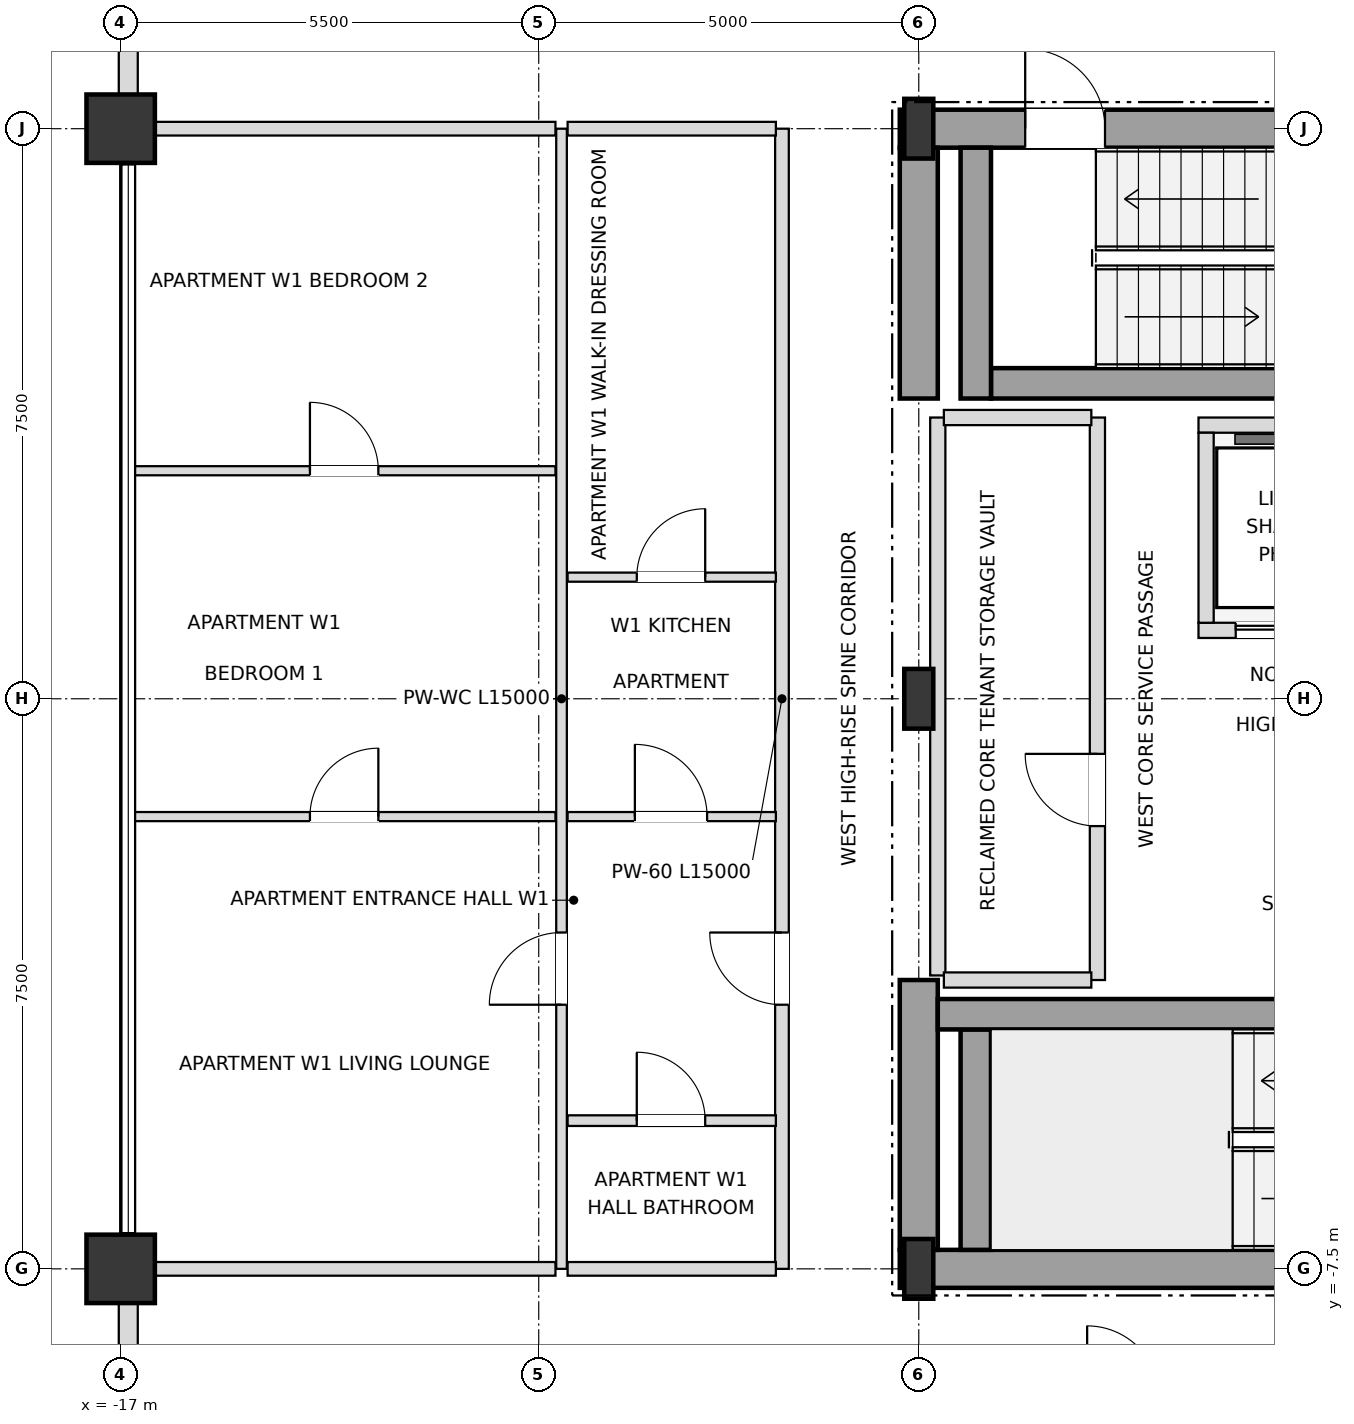
"""IFC4 building model, lengths in metres.
Left out: names, types, materials, properties, quantities, classifications, styles, units other than length and angle.
Written with IfcOpenShell. Run it as: python <this file> out.ifc"""

import sys

from ifc_helpers import new_model, si_unit, direction, frame, frame_2d, origin, origin_2d, place, context, subcontext, project, spatial, rectangle, i_section, extrude, element, fill, save


model = new_model("IFC4")
c1 = context("Model", 3, precision=1e-05, world=origin(), true_north=direction((0.0, 1.0)))
c2 = subcontext(c1, "Body", "Model", "MODEL_VIEW")
j1 = project(units=[si_unit("LENGTHUNIT", "METRE"), si_unit("PLANEANGLEUNIT", "RADIAN")], contexts=[c1])
p1 = place(None, origin())
s1 = spatial("IfcSite", under=j1, at=p1, CompositionType="ELEMENT")
p2 = place(p1, origin())
s2 = spatial("IfcBuilding", under=s1, at=p2, CompositionType="ELEMENT")
p3 = place(p2, frame((0.0, 0.0, 254.7)))
s3 = spatial("IfcBuildingStorey", under=s2, at=p3, CompositionType="ELEMENT", Elevation=254.7)
for number, where, z_axis, x_axis in (
    (1, (-6.5, -7.5, 0.0), (0.0, 0.0, 1.0), (1.0, 0.0, 0.0)),
    (2, (-6.5, 0.0, 0.0), (0.0, 0.0, 1.0), (1.0, 0.0, 0.0)),
    (3, (-6.5, 7.5, 0.0), (0.0, 0.0, 1.0), (1.0, 0.0, 0.0)),
):
    element("IfcColumn", number, at=place(p3, frame(where, z_axis=z_axis, x_axis=x_axis)), inside=s3, PredefinedType="COLUMN", context=c2, shape_type="SweptSolid", body=[
        extrude(i_section(OverallWidth=0.382, OverallDepth=0.786, WebThickness=0.02, FlangeThickness=0.033, at=origin_2d()), origin(), (0.0, 0.0, 1.0), 3.6),
    ])
for number, where, z_axis, x_axis in (
    (4, (-17.0, 7.5, 0.0), (0.0, 0.0, 1.0), (1.0, 0.0, 0.0)),
    (5, (-17.0, -7.5, 0.0), (0.0, 0.0, 1.0), (1.0, 0.0, 0.0)),
):
    element("IfcColumn", number, at=place(p3, frame(where, z_axis=z_axis, x_axis=x_axis)), inside=s3, PredefinedType="USERDEFINED", context=c2, shape_type="SweptSolid", body=[
        extrude(rectangle(XDim=0.9, YDim=0.9, at=origin_2d()), origin(), (0.0, 0.0, 1.0), 3.6),
    ])
p4 = place(p3, frame((-16.9, 12.555, 0.0), z_axis=(0.0, 0.0, 1.0), x_axis=(0.0, -1.0, 0.0)))
e6 = element("IfcWall", 6, at=p4, inside=s3, PredefinedType="SOLIDWALL", context=c2, shape_type="SweptSolid", body=[
    extrude(rectangle(XDim=4.61, YDim=0.25, at=frame_2d((2.305, 0.0))), origin(), (0.0, 0.0, 1.0), 2.748),
])
p5 = place(p4, frame((1.405, 0.0, 0.72)))
e7 = element("IfcOpeningElement", 7, at=p5, cuts=e6, PredefinedType="OPENING", context=c2, shape_type="SweptSolid", body=[
    extrude(rectangle(XDim=1.8, YDim=1.68, at=frame_2d((0.9, 0.84))), frame((0.0, 0.135, 0.0), z_axis=(0.0, -1.0, 0.0), x_axis=(1.0, 0.0, 0.0)), (0.0, 0.0, 1.0), 0.27),
])
p6 = place(p3, frame((-16.9, -7.945, 0.0), z_axis=(0.0, 0.0, 1.0), x_axis=(0.0, -1.0, 0.0)))
e8 = element("IfcWall", 8, at=p6, inside=s3, PredefinedType="SOLIDWALL", context=c2, shape_type="SweptSolid", body=[
    extrude(rectangle(XDim=4.61, YDim=0.25, at=frame_2d((2.305, 0.0))), origin(), (0.0, 0.0, 1.0), 2.748),
])
p7 = place(p6, frame((1.405, 0.0, 0.72)))
e9 = element("IfcOpeningElement", 9, at=p7, cuts=e8, PredefinedType="OPENING", context=c2, shape_type="SweptSolid", body=[
    extrude(rectangle(XDim=1.8, YDim=1.68, at=frame_2d((0.9, 0.84))), frame((0.0, 0.135, 0.0), z_axis=(0.0, -1.0, 0.0), x_axis=(1.0, 0.0, 0.0)), (0.0, 0.0, 1.0), 0.27),
])
p8 = place(p3, frame((-6.75, -7.5, 0.0), z_axis=(0.0, 0.0, 1.0), x_axis=(1.0, 0.0, 0.0)))
e10 = element("IfcWall", 10, at=p8, inside=s3, PredefinedType="SHEAR", context=c2, shape_type="SweptSolid", body=[
    extrude(rectangle(XDim=6.75, YDim=0.5, at=frame_2d((3.375, 0.0))), origin(), (0.0, 0.0, 1.0), 3.38),
])
p9 = place(p3, frame((-6.75, 7.5, 0.0), z_axis=(0.0, 0.0, 1.0), x_axis=(1.0, 0.0, 0.0)))
e11 = element("IfcWall", 11, at=p9, inside=s3, PredefinedType="SHEAR", context=c2, shape_type="SweptSolid", body=[
    extrude(rectangle(XDim=6.75, YDim=0.5, at=frame_2d((3.375, 0.0))), origin(), (0.0, 0.0, 1.0), 3.38),
])
p10 = place(p9, frame((1.65, 0.0, 0.0)))
e12 = element("IfcOpeningElement", 12, at=p10, cuts=e11, PredefinedType="OPENING", context=c2, shape_type="SweptSolid", body=[
    extrude(rectangle(XDim=1.05, YDim=2.15, at=frame_2d((0.525, 1.075))), frame((0.0, 0.26, 0.0), z_axis=(0.0, -1.0, 0.0), x_axis=(1.0, 0.0, 0.0)), (0.0, 0.0, 1.0), 0.52),
])
p11 = place(p3, frame((-6.5, -7.25, 0.0), z_axis=(0.0, 0.0, 1.0), x_axis=(0.0, 1.0, 0.0)))
e13 = element("IfcWall", 13, at=p11, inside=s3, PredefinedType="SHEAR", context=c2, shape_type="SweptSolid", body=[
    extrude(rectangle(XDim=3.55, YDim=0.5, at=frame_2d((1.775, 0.0))), origin(), (0.0, 0.0, 1.0), 3.38),
])
p12 = place(p3, frame((-6.5, 3.95, 0.0), z_axis=(0.0, 0.0, 1.0), x_axis=(0.0, 1.0, 0.0)))
e14 = element("IfcWall", 14, at=p12, inside=s3, PredefinedType="SHEAR", context=c2, shape_type="SweptSolid", body=[
    extrude(rectangle(XDim=3.3, YDim=0.5, at=frame_2d((1.65, 0.0))), origin(), (0.0, 0.0, 1.0), 3.38),
])
p13 = place(p3, frame((-5.75, -7.25, 0.0), z_axis=(0.0, 0.0, 1.0), x_axis=(0.0, 1.0, 0.0)))
e15 = element("IfcWall", 15, at=p13, inside=s3, PredefinedType="SHEAR", context=c2, shape_type="SweptSolid", body=[
    extrude(rectangle(XDim=2.9, YDim=0.4, at=frame_2d((1.45, 0.0))), origin(), (0.0, 0.0, 1.0), 3.38),
])
p14 = place(p3, frame((-6.25, -4.15, 0.0), z_axis=(0.0, 0.0, 1.0), x_axis=(1.0, 0.0, 0.0)))
e16 = element("IfcWall", 16, at=p14, inside=s3, PredefinedType="SHEAR", context=c2, shape_type="SweptSolid", body=[
    extrude(rectangle(XDim=7.78, YDim=0.4, at=frame_2d((3.89, 0.0))), origin(), (0.0, 0.0, 1.0), 3.38),
])
p15 = place(p3, frame((-5.55, 4.15, 0.0), z_axis=(0.0, 0.0, 1.0), x_axis=(1.0, 0.0, 0.0)))
e17 = element("IfcWall", 17, at=p15, inside=s3, PredefinedType="SHEAR", context=c2, shape_type="SweptSolid", body=[
    extrude(rectangle(XDim=7.08, YDim=0.4, at=frame_2d((3.54, 0.0))), origin(), (0.0, 0.0, 1.0), 3.38),
])
p16 = place(p3, frame((-5.75, 3.95, 0.0), z_axis=(0.0, 0.0, 1.0), x_axis=(0.0, 1.0, 0.0)))
e18 = element("IfcWall", 18, at=p16, inside=s3, PredefinedType="SHEAR", context=c2, shape_type="SweptSolid", body=[
    extrude(rectangle(XDim=3.3, YDim=0.4, at=frame_2d((1.65, 0.0))), origin(), (0.0, 0.0, 1.0), 3.38),
])
p17 = place(p3, frame((-2.82, 0.9, 0.0), z_axis=(0.0, 0.0, 1.0), x_axis=(1.0, 0.0, 0.0)))
e19 = element("IfcWall", 19, at=p17, inside=s3, PredefinedType="SOLIDWALL", context=c2, shape_type="SweptSolid", body=[
    extrude(rectangle(XDim=5.58, YDim=0.2, at=frame_2d((2.79, 0.0))), origin(), (0.0, 0.0, 1.0), 3.38),
])
p18 = place(p17, frame((0.49, 0.0, 0.0)))
e20 = element("IfcOpeningElement", 20, at=p18, cuts=e19, PredefinedType="OPENING", context=c2, shape_type="SweptSolid", body=[
    extrude(rectangle(XDim=1.1, YDim=2.15, at=frame_2d((0.55, 1.075))), frame((0.0, 0.11, 0.0), z_axis=(0.0, -1.0, 0.0), x_axis=(1.0, 0.0, 0.0)), (0.0, 0.0, 1.0), 0.22),
])
p19 = place(p17, frame((2.17, 0.0, 0.0)))
e21 = element("IfcOpeningElement", 21, at=p19, cuts=e19, PredefinedType="OPENING", context=c2, shape_type="SweptSolid", body=[
    extrude(rectangle(XDim=1.1, YDim=2.15, at=frame_2d((0.55, 1.075))), frame((0.0, 0.11, 0.0), z_axis=(0.0, -1.0, 0.0), x_axis=(1.0, 0.0, 0.0)), (0.0, 0.0, 1.0), 0.22),
])
p20 = place(p17, frame((3.86, 0.0, 0.0)))
e22 = element("IfcOpeningElement", 22, at=p20, cuts=e19, PredefinedType="OPENING", context=c2, shape_type="SweptSolid", body=[
    extrude(rectangle(XDim=1.2, YDim=2.2, at=frame_2d((0.6, 1.1))), frame((0.0, 0.11, 0.0), z_axis=(0.0, -1.0, 0.0), x_axis=(1.0, 0.0, 0.0)), (0.0, 0.0, 1.0), 0.22),
])
p21 = place(p3, frame((-2.82, 3.6, 0.0), z_axis=(0.0, 0.0, 1.0), x_axis=(1.0, 0.0, 0.0)))
e23 = element("IfcWall", 23, at=p21, inside=s3, PredefinedType="SOLIDWALL", context=c2, shape_type="SweptSolid", body=[
    extrude(rectangle(XDim=5.58, YDim=0.2, at=frame_2d((2.79, 0.0))), origin(), (0.0, 0.0, 1.0), 3.38),
])
p22 = place(p3, frame((-2.72, 1.0, 0.0), z_axis=(0.0, 0.0, 1.0), x_axis=(0.0, 1.0, 0.0)))
e24 = element("IfcWall", 24, at=p22, inside=s3, PredefinedType="SOLIDWALL", context=c2, shape_type="SweptSolid", body=[
    extrude(rectangle(XDim=2.5, YDim=0.2, at=frame_2d((1.25, 0.0))), origin(), (0.0, 0.0, 1.0), 3.38),
])
p23 = place(p3, frame((-11.2, -7.5, 0.0), z_axis=(0.0, 0.0, 1.0), x_axis=(0.0, 1.0, 0.0)))
e25 = element("IfcWall", 25, at=p23, inside=s3, PredefinedType="PARTITIONING", context=c2, shape_type="SweptSolid", body=[
    extrude(rectangle(XDim=15.0, YDim=0.14, at=frame_2d((7.5, 0.0))), origin(), (0.0, 0.0, 1.0), 3.38),
])
p24 = place(p23, frame((3.475, 0.0, 0.0)))
e26 = element("IfcOpeningElement", 26, at=p24, cuts=e25, PredefinedType="OPENING", context=c2, shape_type="SweptSolid", body=[
    extrude(rectangle(XDim=0.95, YDim=2.1, at=frame_2d((0.475, 1.05))), frame((0.0, 0.08, 0.0), z_axis=(0.0, -1.0, 0.0), x_axis=(1.0, 0.0, 0.0)), (0.0, 0.0, 1.0), 0.16),
])
p25 = place(p3, frame((-8.3, -7.5, 0.0), z_axis=(0.0, 0.0, 1.0), x_axis=(0.0, 1.0, 0.0)))
e27 = element("IfcWall", 27, at=p25, inside=s3, PredefinedType="PARTITIONING", context=c2, shape_type="SweptSolid", body=[
    extrude(rectangle(XDim=15.0, YDim=0.18, at=frame_2d((7.5, 0.0))), origin(), (0.0, 0.0, 1.0), 3.38),
])
p26 = place(p25, frame((3.475, 0.0, 0.0)))
e28 = element("IfcOpeningElement", 28, at=p26, cuts=e27, PredefinedType="OPENING", context=c2, shape_type="SweptSolid", body=[
    extrude(rectangle(XDim=0.95, YDim=2.15, at=frame_2d((0.475, 1.075))), frame((0.0, 0.1, 0.0), z_axis=(0.0, -1.0, 0.0), x_axis=(1.0, 0.0, 0.0)), (0.0, 0.0, 1.0), 0.2),
])
p27 = place(p3, frame((-6.25, -3.64, 0.0), z_axis=(0.0, 0.0, 1.0), x_axis=(0.0, 1.0, 0.0)))
e29 = element("IfcWall", 29, at=p27, inside=s3, PredefinedType="SOLIDWALL", context=c2, shape_type="SweptSolid", body=[
    extrude(rectangle(XDim=7.34, YDim=0.2, at=frame_2d((3.67, 0.0))), origin(), (0.0, 0.0, 1.0), 3.38),
])
p28 = place(p3, frame((-4.15, -3.7, 0.0), z_axis=(0.0, 0.0, 1.0), x_axis=(0.0, 1.0, 0.0)))
e30 = element("IfcWall", 30, at=p28, inside=s3, PredefinedType="SOLIDWALL", context=c2, shape_type="SweptSolid", body=[
    extrude(rectangle(XDim=7.4, YDim=0.2, at=frame_2d((3.7, 0.0))), origin(), (0.0, 0.0, 1.0), 3.38),
])
p29 = place(p28, frame((2.025, 0.0, 0.0)))
e31 = element("IfcOpeningElement", 31, at=p29, cuts=e30, PredefinedType="OPENING", context=c2, shape_type="SweptSolid", body=[
    extrude(rectangle(XDim=0.95, YDim=2.15, at=frame_2d((0.475, 1.075))), frame((0.0, 0.11, 0.0), z_axis=(0.0, -1.0, 0.0), x_axis=(1.0, 0.0, 0.0)), (0.0, 0.0, 1.0), 0.22),
])
p30 = place(p3, frame((-16.9, -7.5, 0.0), z_axis=(0.0, 0.0, 1.0), x_axis=(1.0, 0.0, 0.0)))
e32 = element("IfcWall", 32, at=p30, inside=s3, PredefinedType="PARTITIONING", context=c2, shape_type="SweptSolid", body=[
    extrude(rectangle(XDim=5.62, YDim=0.18, at=frame_2d((2.81, 0.0))), origin(), (0.0, 0.0, 1.0), 2.826),
])
p31 = place(p3, frame((-11.12, -7.5, 0.0), z_axis=(0.0, 0.0, 1.0), x_axis=(1.0, 0.0, 0.0)))
e33 = element("IfcWall", 33, at=p31, inside=s3, PredefinedType="PARTITIONING", context=c2, shape_type="SweptSolid", body=[
    extrude(rectangle(XDim=2.74, YDim=0.18, at=frame_2d((1.37, 0.0))), origin(), (0.0, 0.0, 1.0), 2.826),
])
p32 = place(p3, frame((-11.12, -5.55, 0.0), z_axis=(0.0, 0.0, 1.0), x_axis=(1.0, 0.0, 0.0)))
e34 = element("IfcWall", 34, at=p32, inside=s3, PredefinedType="PARTITIONING", context=c2, shape_type="SweptSolid", body=[
    extrude(rectangle(XDim=2.74, YDim=0.14, at=frame_2d((1.37, 0.0))), origin(), (0.0, 0.0, 1.0), 3.38),
])
p33 = place(p32, frame((0.91, 0.0, 0.0)))
e35 = element("IfcOpeningElement", 35, at=p33, cuts=e34, PredefinedType="OPENING", context=c2, shape_type="SweptSolid", body=[
    extrude(rectangle(XDim=0.9, YDim=2.1, at=frame_2d((0.45, 1.05))), frame((0.0, 0.08, 0.0), z_axis=(0.0, -1.0, 0.0), x_axis=(1.0, 0.0, 0.0)), (0.0, 0.0, 1.0), 0.16),
])
p34 = place(p3, frame((-6.17, -3.7, 0.0), z_axis=(0.0, 0.0, 1.0), x_axis=(1.0, 0.0, 0.0)))
e36 = element("IfcWall", 36, at=p34, inside=s3, PredefinedType="SOLIDWALL", context=c2, shape_type="SweptSolid", body=[
    extrude(rectangle(XDim=1.94, YDim=0.2, at=frame_2d((0.97, 0.0))), origin(), (0.0, 0.0, 1.0), 3.38),
])
p35 = place(p3, frame((-16.82, -1.55, 0.0), z_axis=(0.0, 0.0, 1.0), x_axis=(1.0, 0.0, 0.0)))
e37 = element("IfcWall", 37, at=p35, inside=s3, PredefinedType="PARTITIONING", context=c2, shape_type="SweptSolid", body=[
    extrude(rectangle(XDim=5.54, YDim=0.12, at=frame_2d((2.77, 0.0))), origin(), (0.0, 0.0, 1.0), 3.018),
])
p36 = place(p35, frame((2.31, 0.0, 0.0)))
e38 = element("IfcOpeningElement", 38, at=p36, cuts=e37, PredefinedType="OPENING", context=c2, shape_type="SweptSolid", body=[
    extrude(rectangle(XDim=0.9, YDim=2.1, at=frame_2d((0.45, 1.05))), frame((0.0, 0.07, 0.0), z_axis=(0.0, -1.0, 0.0), x_axis=(1.0, 0.0, 0.0)), (0.0, 0.0, 1.0), 0.14),
])
p37 = place(p3, frame((-11.12, -1.55, 0.0), z_axis=(0.0, 0.0, 1.0), x_axis=(1.0, 0.0, 0.0)))
e39 = element("IfcWall", 39, at=p37, inside=s3, PredefinedType="PARTITIONING", context=c2, shape_type="SweptSolid", body=[
    extrude(rectangle(XDim=2.74, YDim=0.12, at=frame_2d((1.37, 0.0))), origin(), (0.0, 0.0, 1.0), 3.38),
])
p38 = place(p37, frame((0.885, 0.0, 0.0)))
e40 = element("IfcOpeningElement", 40, at=p38, cuts=e39, PredefinedType="OPENING", context=c2, shape_type="SweptSolid", body=[
    extrude(rectangle(XDim=0.95, YDim=2.1, at=frame_2d((0.475, 1.05))), frame((0.0, 0.07, 0.0), z_axis=(0.0, -1.0, 0.0), x_axis=(1.0, 0.0, 0.0)), (0.0, 0.0, 1.0), 0.14),
])
p39 = place(p3, frame((-11.12, 1.6, 0.0), z_axis=(0.0, 0.0, 1.0), x_axis=(1.0, 0.0, 0.0)))
e41 = element("IfcWall", 41, at=p39, inside=s3, PredefinedType="PARTITIONING", context=c2, shape_type="SweptSolid", body=[
    extrude(rectangle(XDim=2.74, YDim=0.12, at=frame_2d((1.37, 0.0))), origin(), (0.0, 0.0, 1.0), 3.38),
])
p40 = place(p39, frame((0.91, 0.0, 0.0)))
e42 = element("IfcOpeningElement", 42, at=p40, cuts=e41, PredefinedType="OPENING", context=c2, shape_type="SweptSolid", body=[
    extrude(rectangle(XDim=0.9, YDim=2.1, at=frame_2d((0.45, 1.05))), frame((0.0, 0.07, 0.0), z_axis=(0.0, -1.0, 0.0), x_axis=(1.0, 0.0, 0.0)), (0.0, 0.0, 1.0), 0.14),
])
p41 = place(p3, frame((-16.82, 3.0, 0.0), z_axis=(0.0, 0.0, 1.0), x_axis=(1.0, 0.0, 0.0)))
e43 = element("IfcWall", 43, at=p41, inside=s3, PredefinedType="PARTITIONING", context=c2, shape_type="SweptSolid", body=[
    extrude(rectangle(XDim=5.54, YDim=0.12, at=frame_2d((2.77, 0.0))), origin(), (0.0, 0.0, 1.0), 3.018),
])
p42 = place(p41, frame((2.31, 0.0, 0.0)))
e44 = element("IfcOpeningElement", 44, at=p42, cuts=e43, PredefinedType="OPENING", context=c2, shape_type="SweptSolid", body=[
    extrude(rectangle(XDim=0.9, YDim=2.1, at=frame_2d((0.45, 1.05))), frame((0.0, 0.07, 0.0), z_axis=(0.0, -1.0, 0.0), x_axis=(1.0, 0.0, 0.0)), (0.0, 0.0, 1.0), 0.14),
])
p43 = place(p3, frame((-6.17, 3.7, 0.0), z_axis=(0.0, 0.0, 1.0), x_axis=(1.0, 0.0, 0.0)))
e45 = element("IfcWall", 45, at=p43, inside=s3, PredefinedType="SOLIDWALL", context=c2, shape_type="SweptSolid", body=[
    extrude(rectangle(XDim=1.94, YDim=0.2, at=frame_2d((0.97, 0.0))), origin(), (0.0, 0.0, 1.0), 3.38),
])
p44 = place(p3, frame((-16.9, 7.5, 0.0), z_axis=(0.0, 0.0, 1.0), x_axis=(1.0, 0.0, 0.0)))
e46 = element("IfcWall", 46, at=p44, inside=s3, PredefinedType="PARTITIONING", context=c2, shape_type="SweptSolid", body=[
    extrude(rectangle(XDim=5.62, YDim=0.18, at=frame_2d((2.81, 0.0))), origin(), (0.0, 0.0, 1.0), 2.826),
])
p45 = place(p3, frame((-11.12, 7.5, 0.0), z_axis=(0.0, 0.0, 1.0), x_axis=(1.0, 0.0, 0.0)))
e47 = element("IfcWall", 47, at=p45, inside=s3, PredefinedType="PARTITIONING", context=c2, shape_type="SweptSolid", body=[
    extrude(rectangle(XDim=2.74, YDim=0.18, at=frame_2d((1.37, 0.0))), origin(), (0.0, 0.0, 1.0), 2.826),
])
p46 = place(p10, origin())
e48 = element("IfcDoor", 48, at=p46, inside=s3, OperationType="SINGLE_SWING_LEFT", PredefinedType="DOOR", context=c2, shape_type="SweptSolid", body=[
    extrude(rectangle(XDim=1.05, YDim=2.15, at=frame_2d((0.525, 1.075))), frame((0.0, 0.025, 0.0), z_axis=(0.0, -1.0, 0.0), x_axis=(1.0, 0.0, 0.0)), (0.0, 0.0, 1.0), 0.05),
])
fill(e12, e48)
p47 = place(p18, origin())
e49 = element("IfcDoor", 49, at=p47, inside=s3, OperationType="DOUBLE_DOOR_SLIDING", PredefinedType="DOOR", context=c2, shape_type="SweptSolid", body=[
    extrude(rectangle(XDim=1.1, YDim=2.15, at=frame_2d((0.55, 1.075))), frame((0.0, 0.025, 0.0), z_axis=(0.0, -1.0, 0.0), x_axis=(1.0, 0.0, 0.0)), (0.0, 0.0, 1.0), 0.05),
])
fill(e20, e49)
p48 = place(p29, origin())
e50 = element("IfcDoor", 50, at=p48, inside=s3, OperationType="SINGLE_SWING_RIGHT", PredefinedType="DOOR", context=c2, shape_type="SweptSolid", body=[
    extrude(rectangle(XDim=0.95, YDim=2.15, at=frame_2d((0.475, 1.075))), frame((0.0, 0.025, 0.0), z_axis=(0.0, -1.0, 0.0), x_axis=(1.0, 0.0, 0.0)), (0.0, 0.0, 1.0), 0.05),
])
fill(e31, e50)
p49 = place(p33, origin())
e51 = element("IfcDoor", 51, at=p49, inside=s3, OperationType="SINGLE_SWING_LEFT", PredefinedType="DOOR", context=c2, shape_type="SweptSolid", body=[
    extrude(rectangle(XDim=0.9, YDim=2.1, at=frame_2d((0.45, 1.05))), frame((0.0, 0.025, 0.0), z_axis=(0.0, -1.0, 0.0), x_axis=(1.0, 0.0, 0.0)), (0.0, 0.0, 1.0), 0.05),
])
fill(e35, e51)
p50 = place(p26, origin())
e52 = element("IfcDoor", 52, at=p50, inside=s3, OperationType="SINGLE_SWING_RIGHT", PredefinedType="DOOR", context=c2, shape_type="SweptSolid", body=[
    extrude(rectangle(XDim=0.95, YDim=2.15, at=frame_2d((0.475, 1.075))), frame((0.0, 0.025, 0.0), z_axis=(0.0, -1.0, 0.0), x_axis=(1.0, 0.0, 0.0)), (0.0, 0.0, 1.0), 0.05),
])
fill(e28, e52)
p51 = place(p38, origin())
e53 = element("IfcDoor", 53, at=p51, inside=s3, OperationType="SINGLE_SWING_LEFT", PredefinedType="DOOR", context=c2, shape_type="SweptSolid", body=[
    extrude(rectangle(XDim=0.95, YDim=2.1, at=frame_2d((0.475, 1.05))), frame((0.0, 0.025, 0.0), z_axis=(0.0, -1.0, 0.0), x_axis=(1.0, 0.0, 0.0)), (0.0, 0.0, 1.0), 0.05),
])
fill(e40, e53)
p52 = place(p40, origin())
e54 = element("IfcDoor", 54, at=p52, inside=s3, OperationType="SINGLE_SWING_RIGHT", PredefinedType="DOOR", context=c2, shape_type="SweptSolid", body=[
    extrude(rectangle(XDim=0.9, YDim=2.1, at=frame_2d((0.45, 1.05))), frame((0.0, 0.025, 0.0), z_axis=(0.0, -1.0, 0.0), x_axis=(1.0, 0.0, 0.0)), (0.0, 0.0, 1.0), 0.05),
])
fill(e42, e54)
p53 = place(p24, origin())
e55 = element("IfcDoor", 55, at=p53, inside=s3, OperationType="SINGLE_SWING_LEFT", PredefinedType="DOOR", context=c2, shape_type="SweptSolid", body=[
    extrude(rectangle(XDim=0.95, YDim=2.1, at=frame_2d((0.475, 1.05))), frame((0.0, 0.025, 0.0), z_axis=(0.0, -1.0, 0.0), x_axis=(1.0, 0.0, 0.0)), (0.0, 0.0, 1.0), 0.05),
])
fill(e26, e55)
p54 = place(p36, origin())
e56 = element("IfcDoor", 56, at=p54, inside=s3, OperationType="SINGLE_SWING_RIGHT", PredefinedType="DOOR", context=c2, shape_type="SweptSolid", body=[
    extrude(rectangle(XDim=0.9, YDim=2.1, at=frame_2d((0.45, 1.05))), frame((0.0, 0.025, 0.0), z_axis=(0.0, -1.0, 0.0), x_axis=(1.0, 0.0, 0.0)), (0.0, 0.0, 1.0), 0.05),
])
fill(e38, e56)
p55 = place(p42, origin())
e57 = element("IfcDoor", 57, at=p55, inside=s3, OperationType="SINGLE_SWING_LEFT", PredefinedType="DOOR", context=c2, shape_type="SweptSolid", body=[
    extrude(rectangle(XDim=0.9, YDim=2.1, at=frame_2d((0.45, 1.05))), frame((0.0, 0.025, 0.0), z_axis=(0.0, -1.0, 0.0), x_axis=(1.0, 0.0, 0.0)), (0.0, 0.0, 1.0), 0.05),
])
fill(e44, e57)
save(model, sys.argv[1])
